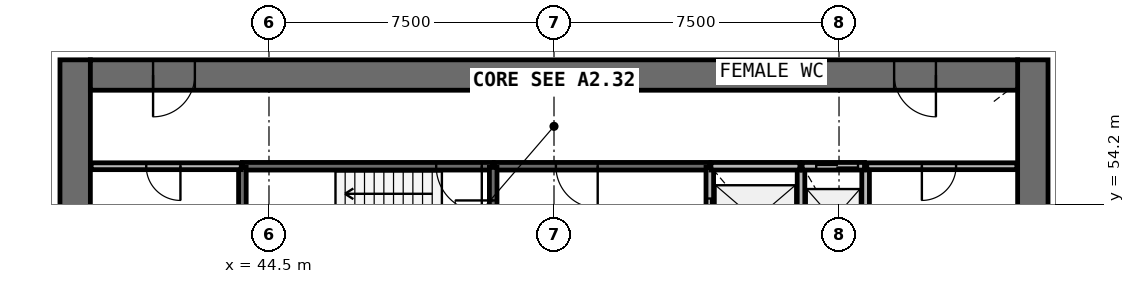
"""IFC4 building model, lengths in metres.
Left out: names, types, materials, properties, quantities, classifications, styles, units other than length and angle.
Written with IfcOpenShell. Run it as: python <this file> out.ifc"""

import sys

from ifc_helpers import new_model, si_unit, direction, frame, frame_2d, origin, place, context, subcontext, project, spatial, rectangle, extrude, source, transform, mapped, element, fill, save


model = new_model("IFC4")
c1 = context("Model", 3, precision=1e-05, world=origin(), true_north=direction((0.0, 1.0)))
c2 = subcontext(c1, "Body", "Model", "MODEL_VIEW")
j1 = project(units=[si_unit("LENGTHUNIT", "METRE"), si_unit("PLANEANGLEUNIT", "RADIAN")], contexts=[c1])
p1 = place(None, origin())
s1 = spatial("IfcSite", under=j1, at=p1, CompositionType="ELEMENT")
p2 = place(p1, origin())
s2 = spatial("IfcBuilding", under=s1, at=p2, CompositionType="ELEMENT")
p3 = place(p2, frame((0.0, 0.0, 133.1)))
s3 = spatial("IfcBuildingStorey", under=s2, at=p3, CompositionType="ELEMENT", Elevation=133.1)
p4 = place(p3, frame((64.6, 38.0, 0.0), z_axis=(0.0, 0.0, 1.0), x_axis=(0.0, 1.0, 0.0)))
e1 = element("IfcWall", 1, at=p4, inside=s3, PredefinedType="SHEAR", context=c2, shape_type="SweptSolid", body=[
    extrude(rectangle(XDim=20.0, YDim=0.8, at=frame_2d((10.0, 0.0))), origin(), (0.0, 0.0, 1.0), 3.9),
])
p5 = place(p4, frame((9.1, 0.0, 0.0)))
e2 = element("IfcOpeningElement", 2, at=p5, cuts=e1, PredefinedType="OPENING", context=c2, shape_type="SweptSolid", body=[
    extrude(rectangle(XDim=1.8, YDim=2.1, at=frame_2d((0.9, 1.05))), frame((0.0, 0.41, 0.0), z_axis=(0.0, -1.0, 0.0), x_axis=(1.0, 0.0, 0.0)), (0.0, 0.0, 1.0), 0.82),
])
p6 = place(p3, frame((39.4, 58.0, 0.0), z_axis=(0.0, 0.0, 1.0), x_axis=(0.0, -1.0, 0.0)))
e3 = element("IfcWall", 3, at=p6, inside=s3, PredefinedType="SHEAR", context=c2, shape_type="SweptSolid", body=[
    extrude(rectangle(XDim=20.0, YDim=0.8, at=frame_2d((10.0, 0.0))), origin(), (0.0, 0.0, 1.0), 3.9),
])
p7 = place(p6, frame((9.1, 0.0, 0.0)))
e4 = element("IfcOpeningElement", 4, at=p7, cuts=e3, PredefinedType="OPENING", context=c2, shape_type="SweptSolid", body=[
    extrude(rectangle(XDim=1.8, YDim=2.1, at=frame_2d((0.9, 1.05))), frame((0.0, 0.41, 0.0), z_axis=(0.0, -1.0, 0.0), x_axis=(1.0, 0.0, 0.0)), (0.0, 0.0, 1.0), 0.82),
])
p8 = place(p3, frame((64.2, 57.6, 0.0), z_axis=(0.0, 0.0, 1.0), x_axis=(-1.0, 0.0, 0.0)))
e5 = element("IfcWall", 5, at=p8, inside=s3, PredefinedType="SHEAR", context=c2, shape_type="SweptSolid", body=[
    extrude(rectangle(XDim=24.4, YDim=0.8, at=frame_2d((12.2, 0.0))), origin(), (0.0, 0.0, 1.0), 3.9),
])
p9 = place(p8, frame((21.65, 0.0, 0.0)))
e6 = element("IfcOpeningElement", 6, at=p9, cuts=e5, PredefinedType="OPENING", context=c2, shape_type="SweptSolid", body=[
    extrude(rectangle(XDim=1.1, YDim=2.1, at=frame_2d((0.55, 1.05))), frame((0.0, 0.41, 0.0), z_axis=(0.0, -1.0, 0.0), x_axis=(1.0, 0.0, 0.0)), (0.0, 0.0, 1.0), 0.82),
])
p10 = place(p8, frame((2.15, 0.0, 0.0)))
e7 = element("IfcOpeningElement", 7, at=p10, cuts=e5, PredefinedType="OPENING", context=c2, shape_type="SweptSolid", body=[
    extrude(rectangle(XDim=1.1, YDim=2.1, at=frame_2d((0.55, 1.05))), frame((0.0, 0.41, 0.0), z_axis=(0.0, -1.0, 0.0), x_axis=(1.0, 0.0, 0.0)), (0.0, 0.0, 1.0), 0.82),
])
p11 = place(p3, frame((50.4, 55.2, 0.0), z_axis=(0.0, 0.0, 1.0), x_axis=(-1.0, 0.0, 0.0)))
e8 = element("IfcWall", 8, at=p11, inside=s3, PredefinedType="SOLIDWALL", context=c2, shape_type="SweptSolid", body=[
    extrude(rectangle(XDim=6.6, YDim=0.2, at=frame_2d((3.3, 0.0))), origin(), (0.0, 0.0, 1.0), 3.58),
])
p12 = place(p11, frame((0.3, 0.0, 0.0)))
e9 = element("IfcOpeningElement", 9, at=p12, cuts=e8, PredefinedType="OPENING", context=c2, shape_type="SweptSolid", body=[
    extrude(rectangle(XDim=1.2, YDim=2.1, at=frame_2d((0.6, 1.05))), frame((0.0, 0.11, 0.0), z_axis=(0.0, -1.0, 0.0), x_axis=(1.0, 0.0, 0.0)), (0.0, 0.0, 1.0), 0.22),
])
p13 = place(p3, frame((56.1, 55.2, 0.0), z_axis=(0.0, 0.0, 1.0), x_axis=(-1.0, 0.0, 0.0)))
e10 = element("IfcWall", 10, at=p13, inside=s3, PredefinedType="SOLIDWALL", context=c2, shape_type="SweptSolid", body=[
    extrude(rectangle(XDim=5.67, YDim=0.2, at=frame_2d((2.835, 0.0))), origin(), (0.0, 0.0, 1.0), 3.58),
])
p14 = place(p13, frame((2.95, 0.0, 0.0)))
e11 = element("IfcOpeningElement", 11, at=p14, cuts=e10, PredefinedType="OPENING", context=c2, shape_type="SweptSolid", body=[
    extrude(rectangle(XDim=1.1, YDim=2.1, at=frame_2d((0.55, 1.05))), frame((0.0, 0.11, 0.0), z_axis=(0.0, -1.0, 0.0), x_axis=(1.0, 0.0, 0.0)), (0.0, 0.0, 1.0), 0.22),
])
p15 = place(p3, frame((50.4, 52.4, 0.0), z_axis=(0.0, 0.0, 1.0), x_axis=(0.0, 1.0, 0.0)))
e12 = element("IfcWall", 12, at=p15, inside=s3, PredefinedType="SOLIDWALL", context=c2, shape_type="SweptSolid", body=[
    extrude(rectangle(XDim=2.77, YDim=0.2, at=frame_2d((1.385, 0.0))), origin(), (0.0, 0.0, 1.0), 3.58),
])
p16 = place(p15, frame((0.9, 0.0, 0.0)))
e13 = element("IfcOpeningElement", 13, at=p16, cuts=e12, PredefinedType="OPENING", context=c2, shape_type="SweptSolid", body=[
    extrude(rectangle(XDim=1.0, YDim=2.1, at=frame_2d((0.5, 1.05))), frame((0.0, 0.11, 0.0), z_axis=(0.0, -1.0, 0.0), x_axis=(1.0, 0.0, 0.0)), (0.0, 0.0, 1.0), 0.22),
])
p17 = place(p3, frame((56.1, 55.17, 0.0), z_axis=(0.0, 0.0, 1.0), x_axis=(0.0, -1.0, 0.0)))
e14 = element("IfcWall", 14, at=p17, inside=s3, PredefinedType="SOLIDWALL", context=c2, shape_type="SweptSolid", body=[
    extrude(rectangle(XDim=2.77, YDim=0.2, at=frame_2d((1.385, 0.0))), origin(), (0.0, 0.0, 1.0), 3.58),
])
p18 = place(p17, frame((0.82, 0.0, 0.0)))
e15 = element("IfcOpeningElement", 15, at=p18, cuts=e14, PredefinedType="OPENING", context=c2, shape_type="SweptSolid", body=[
    extrude(rectangle(XDim=1.1, YDim=2.1, at=frame_2d((0.55, 1.05))), frame((0.0, 0.11, 0.0), z_axis=(0.0, -1.0, 0.0), x_axis=(1.0, 0.0, 0.0)), (0.0, 0.0, 1.0), 0.22),
])
for number, where, z_axis, x_axis in (
    (16, (58.5, 52.4, 0.0), (0.0, 0.0, 1.0), (0.0, 1.0, 0.0)),
    (17, (60.2, 52.4, 0.0), (0.0, 0.0, 1.0), (0.0, 1.0, 0.0)),
):
    element("IfcWall", number, at=place(p3, frame(where, z_axis=z_axis, x_axis=x_axis)), inside=s3, PredefinedType="SOLIDWALL", context=c2, shape_type="SweptSolid", body=[
        extrude(rectangle(XDim=2.8, YDim=0.2, at=frame_2d((1.4, 0.0))), origin(), (0.0, 0.0, 1.0), 3.58),
    ])
p19 = place(p3, frame((58.47, 55.2, 0.0), z_axis=(0.0, 0.0, 1.0), x_axis=(-1.0, 0.0, 0.0)))
e18 = element("IfcWall", 18, at=p19, inside=s3, PredefinedType="SOLIDWALL", context=c2, shape_type="SweptSolid", body=[
    extrude(rectangle(XDim=2.34, YDim=0.2, at=frame_2d((1.17, 0.0))), origin(), (0.0, 0.0, 1.0), 3.58),
])
p20 = place(p3, frame((43.8, 55.17, 0.0), z_axis=(0.0, 0.0, 1.0), x_axis=(0.0, -1.0, 0.0)))
e19 = element("IfcWall", 19, at=p20, inside=s3, PredefinedType="SOLIDWALL", context=c2, shape_type="SweptSolid", body=[
    extrude(rectangle(XDim=2.14, YDim=0.2, at=frame_2d((1.07, 0.0))), origin(), (0.0, 0.0, 1.0), 3.58),
])
p21 = place(p3, frame((60.17, 55.2, 0.0), z_axis=(0.0, 0.0, 1.0), x_axis=(-1.0, 0.0, 0.0)))
e20 = element("IfcWall", 20, at=p21, inside=s3, PredefinedType="SOLIDWALL", context=c2, shape_type="SweptSolid", body=[
    extrude(rectangle(XDim=1.64, YDim=0.2, at=frame_2d((0.82, 0.0))), origin(), (0.0, 0.0, 1.0), 3.58),
])
p22 = place(p21, frame((0.17, 0.0, 0.0)))
e21 = element("IfcOpeningElement", 21, at=p22, cuts=e20, PredefinedType="OPENING", context=c2, shape_type="SweptSolid", body=[
    extrude(rectangle(XDim=1.1, YDim=2.1, at=frame_2d((0.55, 1.05))), frame((0.0, 0.11, 0.0), z_axis=(0.0, -1.0, 0.0), x_axis=(1.0, 0.0, 0.0)), (0.0, 0.0, 1.0), 0.22),
])
p23 = place(p3, frame((64.18, 55.2, 0.0), z_axis=(0.0, 0.0, 1.0), x_axis=(-1.0, 0.0, 0.0)))
e22 = element("IfcWall", 22, at=p23, inside=s3, PredefinedType="PARTITIONING", context=c2, shape_type="SweptSolid", body=[
    extrude(rectangle(XDim=3.95, YDim=0.18, at=frame_2d((1.975, 0.0))), origin(), (0.0, 0.0, 1.0), 3.58),
])
p24 = place(p23, frame((1.6, 0.0, 0.0)))
e23 = element("IfcOpeningElement", 23, at=p24, cuts=e22, PredefinedType="OPENING", context=c2, shape_type="SweptSolid", body=[
    extrude(rectangle(XDim=0.9, YDim=2.1, at=frame_2d((0.45, 1.05))), frame((0.0, 0.1, 0.0), z_axis=(0.0, -1.0, 0.0), x_axis=(1.0, 0.0, 0.0)), (0.0, 0.0, 1.0), 0.2),
])
p25 = place(p3, frame((43.77, 55.2, 0.0), z_axis=(0.0, 0.0, 1.0), x_axis=(-1.0, 0.0, 0.0)))
e24 = element("IfcWall", 24, at=p25, inside=s3, PredefinedType="PARTITIONING", context=c2, shape_type="SweptSolid", body=[
    extrude(rectangle(XDim=3.95, YDim=0.18, at=frame_2d((1.975, 0.0))), origin(), (0.0, 0.0, 1.0), 3.58),
])
p26 = place(p25, frame((1.6, 0.0, 0.0)))
e25 = element("IfcOpeningElement", 25, at=p26, cuts=e24, PredefinedType="OPENING", context=c2, shape_type="SweptSolid", body=[
    extrude(rectangle(XDim=0.9, YDim=2.1, at=frame_2d((0.45, 1.05))), frame((0.0, 0.1, 0.0), z_axis=(0.0, -1.0, 0.0), x_axis=(1.0, 0.0, 0.0)), (0.0, 0.0, 1.0), 0.2),
])
m1 = source(origin(), c2, "Body", "SweptSolid", [
    extrude(rectangle(XDim=1.1, YDim=2.1, at=frame_2d((0.55, 1.05))), frame((0.0, 0.025, 0.0), z_axis=(0.0, -1.0, 0.0), x_axis=(1.0, 0.0, 0.0)), (0.0, 0.0, 1.0), 0.05),
])
p27 = place(p18, origin())
e26 = element("IfcDoor", 26, at=p27, inside=s3, OperationType="DOUBLE_DOOR_SLIDING", PredefinedType="USERDEFINED", context=c2, shape_type="MappedRepresentation", body=[
    mapped(m1, transform((0.0, 0.0, 0.0), scale=1.0)),
])
fill(e15, e26)
p28 = place(p22, origin())
e27 = element("IfcDoor", 27, at=p28, inside=s3, OperationType="DOUBLE_DOOR_SLIDING", PredefinedType="USERDEFINED", context=c2, shape_type="MappedRepresentation", body=[
    mapped(m1, transform((0.0, 0.0, 0.0), scale=1.0)),
])
fill(e21, e27)
m2 = source(origin(), c2, "Body", "SweptSolid", [
    extrude(rectangle(XDim=1.2, YDim=2.1, at=frame_2d((0.6, 1.05))), frame((0.0, 0.025, 0.0), z_axis=(0.0, -1.0, 0.0), x_axis=(1.0, 0.0, 0.0)), (0.0, 0.0, 1.0), 0.05),
])
p29 = place(p12, origin())
e28 = element("IfcDoor", 28, at=p29, inside=s3, OperationType="SINGLE_SWING_LEFT", PredefinedType="DOOR", context=c2, shape_type="MappedRepresentation", body=[
    mapped(m2, transform((0.0, 0.0, 0.0), scale=1.0)),
])
fill(e9, e28)
m3 = source(origin(), c2, "Body", "SweptSolid", [
    extrude(rectangle(XDim=1.0, YDim=2.1, at=frame_2d((0.5, 1.05))), frame((0.0, 0.025, 0.0), z_axis=(0.0, -1.0, 0.0), x_axis=(1.0, 0.0, 0.0)), (0.0, 0.0, 1.0), 0.05),
])
p30 = place(p16, origin())
e29 = element("IfcDoor", 29, at=p30, inside=s3, OperationType="SINGLE_SWING_RIGHT", PredefinedType="DOOR", context=c2, shape_type="MappedRepresentation", body=[
    mapped(m3, transform((0.0, 0.0, 0.0), scale=1.0)),
])
fill(e13, e29)
m4 = source(origin(), c2, "Body", "SweptSolid", [
    extrude(rectangle(XDim=1.1, YDim=2.1, at=frame_2d((0.55, 1.05))), frame((0.0, 0.025, 0.0), z_axis=(0.0, -1.0, 0.0), x_axis=(1.0, 0.0, 0.0)), (0.0, 0.0, 1.0), 0.05),
])
p31 = place(p14, origin())
e30 = element("IfcDoor", 30, at=p31, inside=s3, OperationType="SINGLE_SWING_LEFT", PredefinedType="DOOR", context=c2, shape_type="MappedRepresentation", body=[
    mapped(m4, transform((0.0, 0.0, 0.0), scale=1.0)),
])
fill(e11, e30)
m5 = source(origin(), c2, "Body", "SweptSolid", [
    extrude(rectangle(XDim=1.1, YDim=2.1, at=frame_2d((0.55, 1.05))), frame((0.0, 0.025, 0.0), z_axis=(0.0, -1.0, 0.0), x_axis=(1.0, 0.0, 0.0)), (0.0, 0.0, 1.0), 0.05),
])
p32 = place(p9, origin())
e31 = element("IfcDoor", 31, at=p32, inside=s3, OperationType="SINGLE_SWING_RIGHT", PredefinedType="DOOR", context=c2, shape_type="MappedRepresentation", body=[
    mapped(m5, transform((0.0, 0.0, 0.0), scale=1.0)),
])
fill(e6, e31)
p33 = place(p10, origin())
e32 = element("IfcDoor", 32, at=p33, inside=s3, OperationType="SINGLE_SWING_LEFT", PredefinedType="DOOR", context=c2, shape_type="MappedRepresentation", body=[
    mapped(m5, transform((0.0, 0.0, 0.0), scale=1.0)),
])
fill(e7, e32)
m6 = source(origin(), c2, "Body", "SweptSolid", [
    extrude(rectangle(XDim=0.9, YDim=2.1, at=frame_2d((0.45, 1.05))), frame((0.0, 0.025, 0.0), z_axis=(0.0, -1.0, 0.0), x_axis=(1.0, 0.0, 0.0)), (0.0, 0.0, 1.0), 0.05),
])
p34 = place(p26, origin())
e33 = element("IfcDoor", 33, at=p34, inside=s3, OperationType="SINGLE_SWING_LEFT", PredefinedType="DOOR", context=c2, shape_type="MappedRepresentation", body=[
    mapped(m6, transform((0.0, 0.0, 0.0), scale=1.0)),
])
fill(e25, e33)
p35 = place(p24, origin())
e34 = element("IfcDoor", 34, at=p35, inside=s3, OperationType="SINGLE_SWING_RIGHT", PredefinedType="DOOR", context=c2, shape_type="MappedRepresentation", body=[
    mapped(m6, transform((0.0, 0.0, 0.0), scale=1.0)),
])
fill(e23, e34)
save(model, sys.argv[1])
